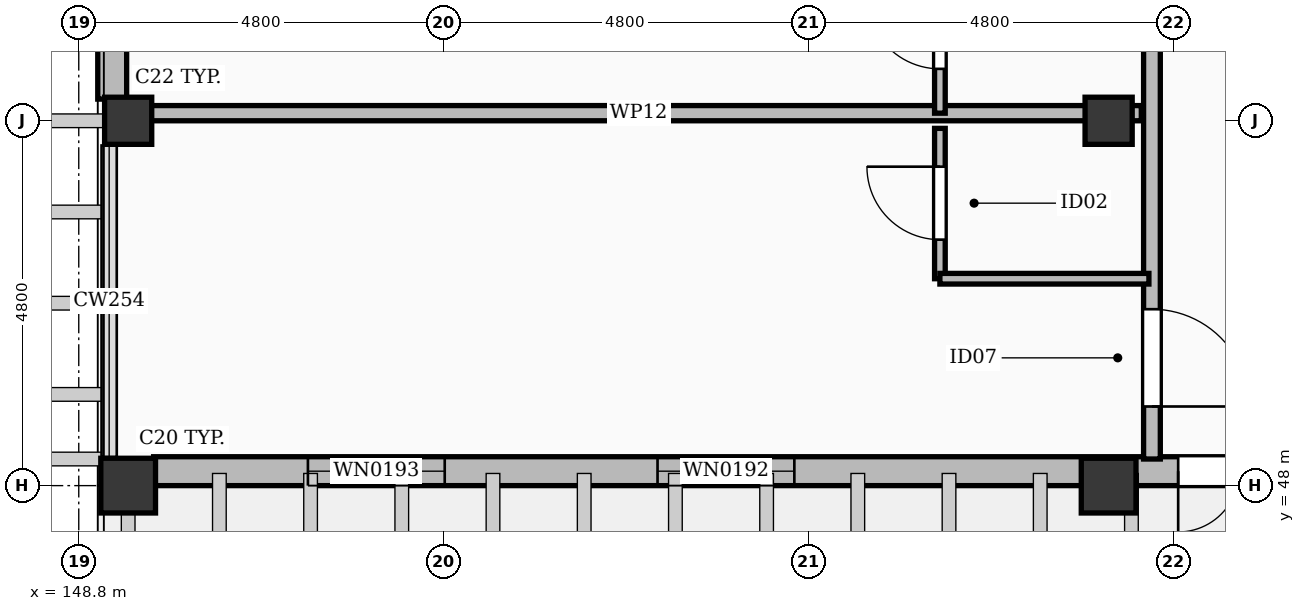
"""IFC4 building model, lengths in metres.
Left out: names, types, materials, properties, quantities, classifications, styles, units other than length and angle.
Written with IfcOpenShell. Run it as: python <this file> out.ifc"""

import sys

from ifc_helpers import new_model, si_unit, direction, frame, frame_2d, origin, origin_2d, place, context, subcontext, project, spatial, rectangle, extrude, element, fill, save


model = new_model("IFC4")
c1 = context("Model", 3, precision=1e-05, world=origin(), true_north=direction((0.0, 1.0)))
c2 = subcontext(c1, "Body", "Model", "MODEL_VIEW")
j1 = project(units=[si_unit("LENGTHUNIT", "METRE"), si_unit("PLANEANGLEUNIT", "RADIAN")], contexts=[c1])
p1 = place(None, origin())
s1 = spatial("IfcSite", under=j1, at=p1, CompositionType="ELEMENT")
p2 = place(p1, origin())
s2 = spatial("IfcBuilding", under=s1, at=p2, CompositionType="ELEMENT")
p3 = place(p2, frame((0.0, 0.0, 31.8)))
s3 = spatial("IfcBuildingStorey", under=s2, at=p3, CompositionType="ELEMENT", Elevation=31.8)
for number, where, z_axis, x_axis in (
    (1, (149.45, 48.0, 0.0), (0.0, 0.0, 1.0), (1.0, 0.0, 0.0)),
    (2, (162.35, 48.0, 0.0), (0.0, 0.0, 1.0), (1.0, 0.0, 0.0)),
):
    element("IfcColumn", number, at=place(p3, frame(where, z_axis=z_axis, x_axis=x_axis)), inside=s3, PredefinedType="COLUMN", context=c2, shape_type="SweptSolid", body=[
        extrude(rectangle(XDim=0.72, YDim=0.72, at=origin_2d()), origin(), (0.0, 0.0, 1.0), 3.6),
    ])
for number, where, z_axis, x_axis in (
    (3, (149.45, 52.8, 0.0), (0.0, 0.0, 1.0), (1.0, 0.0, 0.0)),
    (4, (162.35, 52.8, 0.0), (0.0, 0.0, 1.0), (1.0, 0.0, 0.0)),
):
    element("IfcColumn", number, at=place(p3, frame(where, z_axis=z_axis, x_axis=x_axis)), inside=s3, PredefinedType="COLUMN", context=c2, shape_type="SweptSolid", body=[
        extrude(rectangle(XDim=0.62, YDim=0.62, at=origin_2d()), origin(), (0.0, 0.0, 1.0), 3.6),
    ])
p4 = place(p3, frame((179.015, 48.19, 0.0), z_axis=(0.0, 0.0, 1.0), x_axis=(-1.0, 0.0, 0.0)))
e5 = element("IfcWall", 5, at=p4, inside=s3, PredefinedType="SOLIDWALL", context=c2, shape_type="SweptSolid", body=[
    extrude(rectangle(XDim=29.23, YDim=0.38, at=frame_2d((14.615, 0.0))), origin(), (0.0, 0.0, 1.0), 2.602),
])
p5 = place(p4, frame((14.15, 0.0, 0.0)))
e6 = element("IfcOpeningElement", 6, at=p5, cuts=e5, PredefinedType="OPENING", context=c2, shape_type="SweptSolid", body=[
    extrude(rectangle(XDim=1.6, YDim=2.25, at=frame_2d((0.8, 1.125))), frame((0.0, 0.202, 0.0), z_axis=(0.0, -1.0, 0.0), x_axis=(1.0, 0.0, 0.0)), (0.0, 0.0, 1.0), 0.404),
])
p6 = place(p4, frame((4.0, 0.0, 0.55)))
e7 = element("IfcOpeningElement", 7, at=p6, cuts=e5, PredefinedType="OPENING", context=c2, shape_type="SweptSolid", body=[
    extrude(rectangle(XDim=1.8, YDim=1.76, at=frame_2d((0.9, 0.88))), frame((0.0, 0.202, 0.0), z_axis=(0.0, -1.0, 0.0), x_axis=(1.0, 0.0, 0.0)), (0.0, 0.0, 1.0), 0.404),
])
p7 = place(p4, frame((9.6, 0.0, 0.55)))
e8 = element("IfcOpeningElement", 8, at=p7, cuts=e5, PredefinedType="OPENING", context=c2, shape_type="SweptSolid", body=[
    extrude(rectangle(XDim=1.8, YDim=1.76, at=frame_2d((0.9, 0.88))), frame((0.0, 0.202, 0.0), z_axis=(0.0, -1.0, 0.0), x_axis=(1.0, 0.0, 0.0)), (0.0, 0.0, 1.0), 0.404),
])
p8 = place(p4, frame((20.8, 0.0, 0.55)))
e9 = element("IfcOpeningElement", 9, at=p8, cuts=e5, PredefinedType="OPENING", context=c2, shape_type="SweptSolid", body=[
    extrude(rectangle(XDim=1.8, YDim=1.76, at=frame_2d((0.9, 0.88))), frame((0.0, 0.202, 0.0), z_axis=(0.0, -1.0, 0.0), x_axis=(1.0, 0.0, 0.0)), (0.0, 0.0, 1.0), 0.404),
])
p9 = place(p4, frame((25.4, 0.0, 0.55)))
e10 = element("IfcOpeningElement", 10, at=p9, cuts=e5, PredefinedType="OPENING", context=c2, shape_type="SweptSolid", body=[
    extrude(rectangle(XDim=1.8, YDim=1.76, at=frame_2d((0.9, 0.88))), frame((0.0, 0.202, 0.0), z_axis=(0.0, -1.0, 0.0), x_axis=(1.0, 0.0, 0.0)), (0.0, 0.0, 1.0), 0.404),
])
p10 = place(p3, frame((149.24, 53.085, 0.0), z_axis=(0.0, 0.0, 1.0), x_axis=(0.0, 1.0, 0.0)))
e11 = element("IfcWall", 11, at=p10, inside=s3, PredefinedType="SOLIDWALL", context=c2, shape_type="SweptSolid", body=[
    extrude(rectangle(XDim=4.18, YDim=0.38, at=frame_2d((2.09, 0.0))), origin(), (0.0, 0.0, 1.0), 2.732),
])
p11 = place(p10, frame((1.565, 0.0, 0.55)))
e12 = element("IfcOpeningElement", 12, at=p11, cuts=e11, PredefinedType="OPENING", context=c2, shape_type="SweptSolid", body=[
    extrude(rectangle(XDim=1.05, YDim=1.65, at=frame_2d((0.525, 0.825))), frame((0.0, 0.202, 0.0), z_axis=(0.0, -1.0, 0.0), x_axis=(1.0, 0.0, 0.0)), (0.0, 0.0, 1.0), 0.404),
])
p12 = place(p3, frame((162.92, 48.35, 0.0), z_axis=(0.0, 0.0, 1.0), x_axis=(0.0, 1.0, 0.0)))
e13 = element("IfcWall", 13, at=p12, inside=s3, PredefinedType="PARTITIONING", context=c2, shape_type="SweptSolid", body=[
    extrude(rectangle(XDim=24.85, YDim=0.22, at=frame_2d((12.425, 0.0))), origin(), (0.0, 0.0, 1.0), 2.732),
])
p13 = place(p12, frame((0.691, 0.0, 0.0)))
e14 = element("IfcOpeningElement", 14, at=p13, cuts=e13, PredefinedType="OPENING", context=c2, shape_type="SweptSolid", body=[
    extrude(rectangle(XDim=1.28, YDim=2.16, at=frame_2d((0.64, 1.08))), frame((0.0, 0.122, 0.0), z_axis=(0.0, -1.0, 0.0), x_axis=(1.0, 0.0, 0.0)), (0.0, 0.0, 1.0), 0.244),
])
p14 = place(p12, frame((7.388, 0.0, 0.0)))
e15 = element("IfcOpeningElement", 15, at=p14, cuts=e13, PredefinedType="OPENING", context=c2, shape_type="SweptSolid", body=[
    extrude(rectangle(XDim=1.05, YDim=2.18, at=frame_2d((0.525, 1.09))), frame((0.0, 0.122, 0.0), z_axis=(0.0, -1.0, 0.0), x_axis=(1.0, 0.0, 0.0)), (0.0, 0.0, 1.0), 0.244),
])
p15 = place(p12, frame((12.188, 0.0, 0.0)))
e16 = element("IfcOpeningElement", 16, at=p15, cuts=e13, PredefinedType="OPENING", context=c2, shape_type="SweptSolid", body=[
    extrude(rectangle(XDim=1.08, YDim=2.25, at=frame_2d((0.54, 1.125))), frame((0.0, 0.122, 0.0), z_axis=(0.0, -1.0, 0.0), x_axis=(1.0, 0.0, 0.0)), (0.0, 0.0, 1.0), 0.244),
])
p16 = place(p12, frame((16.988, 0.0, 0.0)))
e17 = element("IfcOpeningElement", 17, at=p16, cuts=e13, PredefinedType="OPENING", context=c2, shape_type="SweptSolid", body=[
    extrude(rectangle(XDim=1.02, YDim=2.2, at=frame_2d((0.51, 1.1))), frame((0.0, 0.122, 0.0), z_axis=(0.0, -1.0, 0.0), x_axis=(1.0, 0.0, 0.0)), (0.0, 0.0, 1.0), 0.244),
])
p17 = place(p12, frame((21.438, 0.0, 0.0)))
e18 = element("IfcOpeningElement", 18, at=p17, cuts=e13, PredefinedType="OPENING", context=c2, shape_type="SweptSolid", body=[
    extrude(rectangle(XDim=1.5, YDim=2.3, at=frame_2d((0.75, 1.15))), frame((0.0, 0.122, 0.0), z_axis=(0.0, -1.0, 0.0), x_axis=(1.0, 0.0, 0.0)), (0.0, 0.0, 1.0), 0.244),
])
p18 = place(p3, frame((160.13, 50.722, 0.0), z_axis=(0.0, 0.0, 1.0), x_axis=(0.0, 1.0, 0.0)))
e19 = element("IfcWall", 19, at=p18, inside=s3, PredefinedType="PARTITIONING", context=c2, shape_type="SweptSolid", body=[
    extrude(rectangle(XDim=1.978, YDim=0.14, at=frame_2d((0.989, 0.0))), origin(), (0.0, 0.0, 1.0), 2.732),
])
p19 = place(p18, frame((0.514, 0.0, 0.0)))
e20 = element("IfcOpeningElement", 20, at=p19, cuts=e19, PredefinedType="OPENING", context=c2, shape_type="SweptSolid", body=[
    extrude(rectangle(XDim=0.96, YDim=2.12, at=frame_2d((0.48, 1.06))), frame((0.0, 0.082, 0.0), z_axis=(0.0, -1.0, 0.0), x_axis=(1.0, 0.0, 0.0)), (0.0, 0.0, 1.0), 0.164),
])
p20 = place(p3, frame((160.13, 50.722, 0.0), z_axis=(0.0, 0.0, 1.0), x_axis=(1.0, 0.0, 0.0)))
e21 = element("IfcWall", 21, at=p20, inside=s3, PredefinedType="PARTITIONING", context=c2, shape_type="SweptSolid", body=[
    extrude(rectangle(XDim=2.75, YDim=0.14, at=frame_2d((1.375, 0.0))), origin(), (0.0, 0.0, 1.0), 2.732),
])
p21 = place(p3, frame((149.55, 52.9, 0.0), z_axis=(0.0, 0.0, 1.0), x_axis=(1.0, 0.0, 0.0)))
e22 = element("IfcWall", 22, at=p21, inside=s3, PredefinedType="PARTITIONING", context=c2, shape_type="SweptSolid", body=[
    extrude(rectangle(XDim=13.23, YDim=0.2, at=frame_2d((6.615, 0.0))), origin(), (0.0, 0.0, 1.0), 2.732),
])
p22 = place(p3, frame((160.13, 52.9, 0.0), z_axis=(0.0, 0.0, 1.0), x_axis=(0.0, 1.0, 0.0)))
e23 = element("IfcWall", 23, at=p22, inside=s3, PredefinedType="PARTITIONING", context=c2, shape_type="SweptSolid", body=[
    extrude(rectangle(XDim=2.116, YDim=0.14, at=frame_2d((1.058, 0.0))), origin(), (0.0, 0.0, 1.0), 2.732),
])
p23 = place(p22, frame((0.583, 0.0, 0.0)))
e24 = element("IfcOpeningElement", 24, at=p23, cuts=e23, PredefinedType="OPENING", context=c2, shape_type="SweptSolid", body=[
    extrude(rectangle(XDim=0.96, YDim=2.12, at=frame_2d((0.48, 1.06))), frame((0.0, 0.082, 0.0), z_axis=(0.0, -1.0, 0.0), x_axis=(1.0, 0.0, 0.0)), (0.0, 0.0, 1.0), 0.164),
])
p24 = place(p5, origin())
e25 = element("IfcDoor", 25, at=p24, inside=s3, OperationType="DOUBLE_DOOR_SINGLE_SWING", PredefinedType="DOOR", context=c2, shape_type="SweptSolid", body=[
    extrude(rectangle(XDim=1.6, YDim=2.25, at=frame_2d((0.8, 1.125))), frame((0.0, 0.025, 0.0), z_axis=(0.0, -1.0, 0.0), x_axis=(1.0, 0.0, 0.0)), (0.0, 0.0, 1.0), 0.05),
])
fill(e6, e25)
p25 = place(p8, origin())
e26 = element("IfcWindow", 26, at=p25, inside=s3, PartitioningType="SINGLE_PANEL", PredefinedType="WINDOW", context=c2, shape_type="SweptSolid", body=[
    extrude(rectangle(XDim=1.8, YDim=1.76, at=frame_2d((0.9, 0.88))), frame((0.0, 0.03, 0.0), z_axis=(0.0, -1.0, 0.0), x_axis=(1.0, 0.0, 0.0)), (0.0, 0.0, 1.0), 0.06),
])
fill(e9, e26)
p26 = place(p9, origin())
e27 = element("IfcWindow", 27, at=p26, inside=s3, PartitioningType="SINGLE_PANEL", PredefinedType="WINDOW", context=c2, shape_type="SweptSolid", body=[
    extrude(rectangle(XDim=1.8, YDim=1.76, at=frame_2d((0.9, 0.88))), frame((0.0, 0.03, 0.0), z_axis=(0.0, -1.0, 0.0), x_axis=(1.0, 0.0, 0.0)), (0.0, 0.0, 1.0), 0.06),
])
fill(e10, e27)
p27 = place(p13, frame((1.28, 0.0, 0.0), z_axis=(0.0, 0.0, 1.0), x_axis=(-1.0, 0.0, 0.0)))
e28 = element("IfcDoor", 28, at=p27, inside=s3, OperationType="SINGLE_SWING_LEFT", PredefinedType="DOOR", context=c2, shape_type="SweptSolid", body=[
    extrude(rectangle(XDim=1.28, YDim=2.16, at=frame_2d((0.64, 1.08))), frame((0.0, 0.025, 0.0), z_axis=(0.0, -1.0, 0.0), x_axis=(1.0, 0.0, 0.0)), (0.0, 0.0, 1.0), 0.05),
])
fill(e14, e28)
p28 = place(p19, origin())
e29 = element("IfcDoor", 29, at=p28, inside=s3, OperationType="SINGLE_SWING_RIGHT", PredefinedType="DOOR", context=c2, shape_type="SweptSolid", body=[
    extrude(rectangle(XDim=0.96, YDim=2.12, at=frame_2d((0.48, 1.06))), frame((0.0, 0.025, 0.0), z_axis=(0.0, -1.0, 0.0), x_axis=(1.0, 0.0, 0.0)), (0.0, 0.0, 1.0), 0.05),
])
fill(e20, e29)
p29 = place(p23, origin())
e30 = element("IfcDoor", 30, at=p29, inside=s3, OperationType="SINGLE_SWING_RIGHT", PredefinedType="DOOR", context=c2, shape_type="SweptSolid", body=[
    extrude(rectangle(XDim=0.96, YDim=2.12, at=frame_2d((0.48, 1.06))), frame((0.0, 0.025, 0.0), z_axis=(0.0, -1.0, 0.0), x_axis=(1.0, 0.0, 0.0)), (0.0, 0.0, 1.0), 0.05),
])
fill(e24, e30)
save(model, sys.argv[1])
